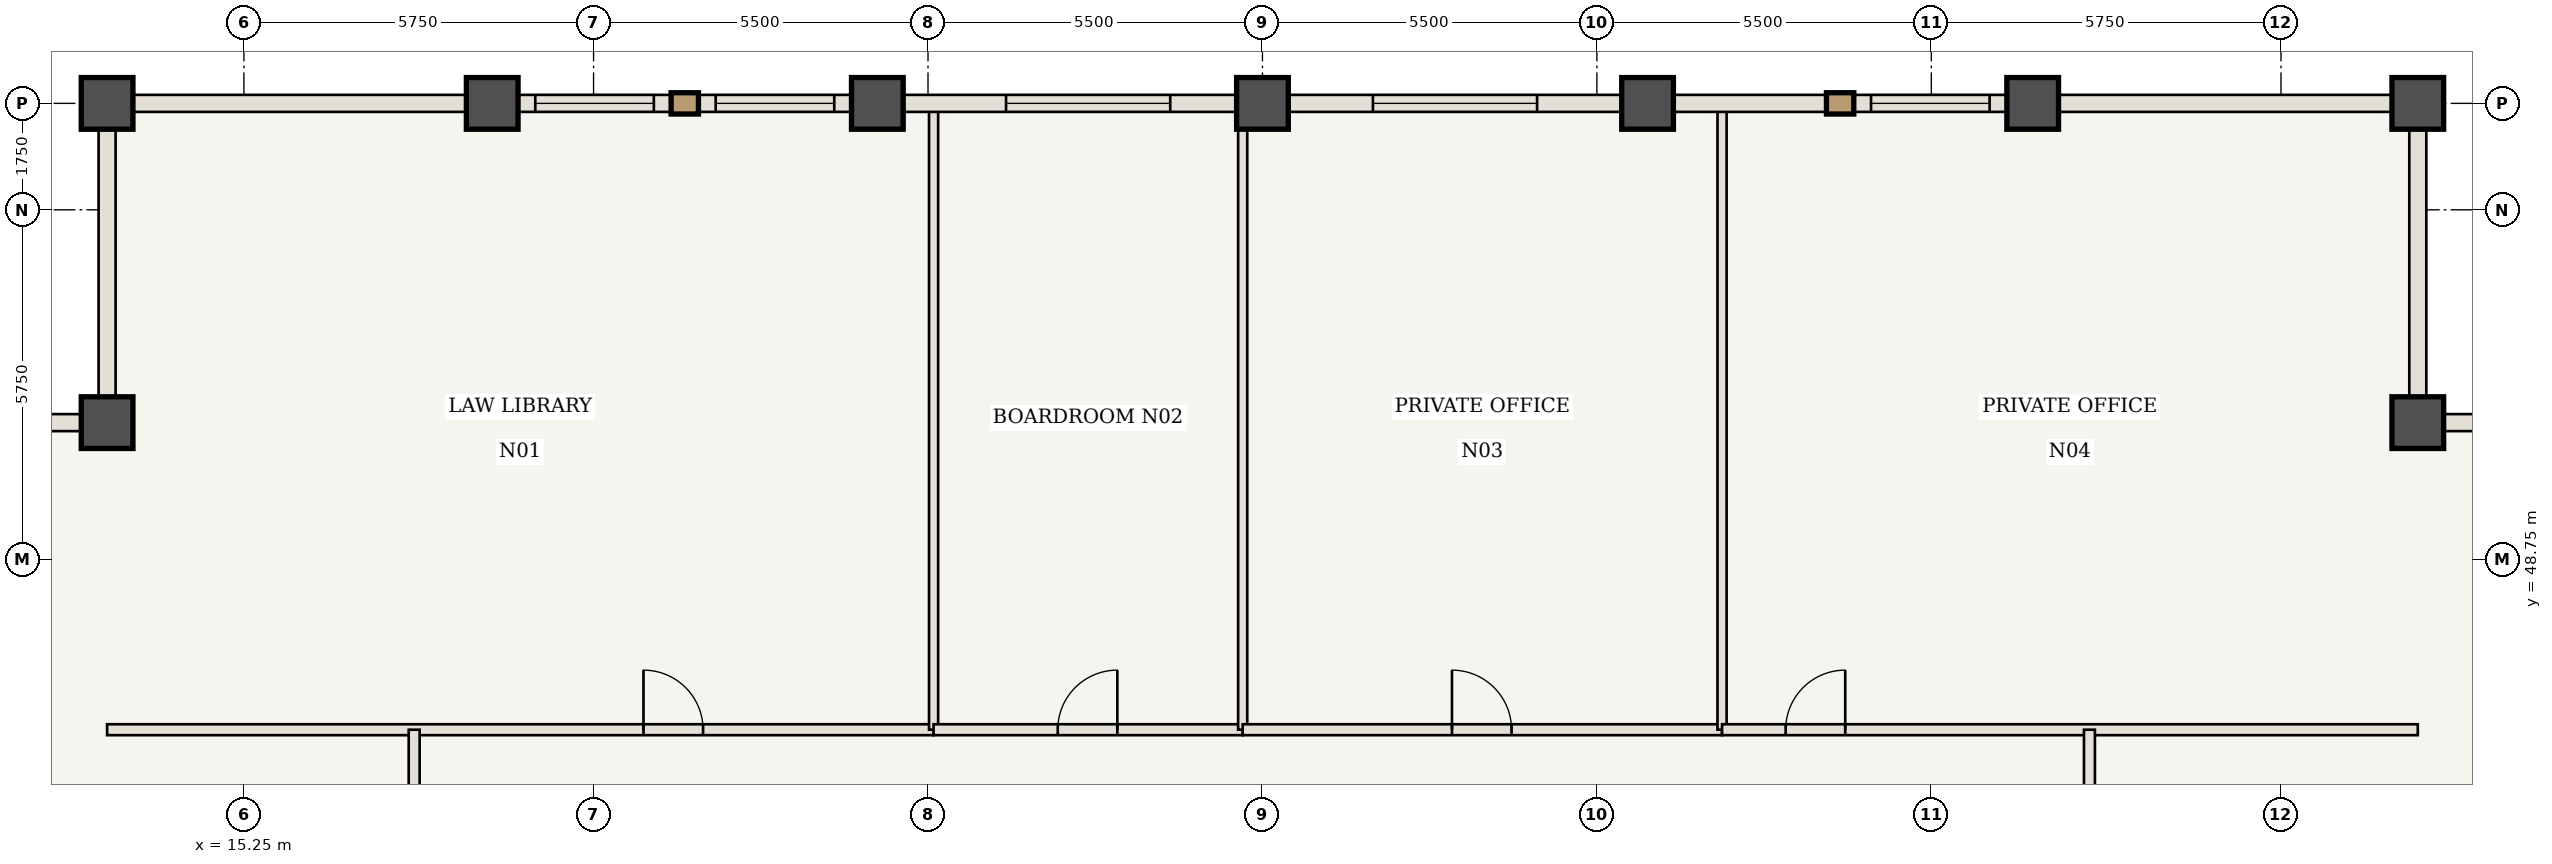
"""IFC4 building model, lengths in metres.
Left out: names, types, materials, properties, quantities, classifications, styles, units other than length and angle.
Written with IfcOpenShell. Run it as: python <this file> out.ifc"""

import sys

from ifc_helpers import new_model, si_unit, direction, frame, frame_2d, origin, origin_2d, place, context, subcontext, project, spatial, rectangle, extrude, element, fill, save


model = new_model("IFC4")
c1 = context("Model", 3, precision=1e-05, world=origin(), true_north=direction((0.0, 1.0)))
c2 = subcontext(c1, "Body", "Model", "MODEL_VIEW")
j1 = project(units=[si_unit("LENGTHUNIT", "METRE"), si_unit("PLANEANGLEUNIT", "RADIAN")], contexts=[c1])
p1 = place(None, origin())
s1 = spatial("IfcSite", under=j1, at=p1, CompositionType="ELEMENT")
p2 = place(p1, origin())
s2 = spatial("IfcBuilding", under=s1, at=p2, CompositionType="ELEMENT")
p3 = place(p2, frame((0.0, 0.0, 202.3)))
s3 = spatial("IfcBuildingStorey", under=s2, at=p3, CompositionType="ELEMENT", Elevation=202.3)
for number, where, z_axis, x_axis in (
    (1, (51.0, 51.0, 0.0), (0.0, 0.0, 1.0), (1.0, 0.0, 0.0)),
    (2, (51.0, 56.25, 0.0), (0.0, 0.0, 1.0), (1.0, 0.0, 0.0)),
    (3, (13.0, 56.25, 0.0), (0.0, 0.0, 1.0), (1.0, 0.0, 0.0)),
    (4, (13.0, 51.0, 0.0), (0.0, 0.0, 1.0), (1.0, 0.0, 0.0)),
    (5, (19.333, 56.25, 0.0), (0.0, 0.0, 1.0), (1.0, 0.0, 0.0)),
    (6, (25.667, 56.25, 0.0), (0.0, 0.0, 1.0), (1.0, 0.0, 0.0)),
    (7, (32.0, 56.25, 0.0), (0.0, 0.0, 1.0), (1.0, 0.0, 0.0)),
    (8, (38.333, 56.25, 0.0), (0.0, 0.0, 1.0), (1.0, 0.0, 0.0)),
    (9, (44.667, 56.25, 0.0), (0.0, 0.0, 1.0), (1.0, 0.0, 0.0)),
):
    element("IfcColumn", number, at=place(p3, frame(where, z_axis=z_axis, x_axis=x_axis)), inside=s3, PredefinedType="COLUMN", context=c2, shape_type="SweptSolid", body=[
        extrude(rectangle(XDim=0.85, YDim=0.85, at=origin_2d()), origin(), (0.0, 0.0, 1.0), 3.85),
    ])
p4 = place(p3, frame((13.0, 45.95, 0.0), z_axis=(0.0, 0.0, 1.0), x_axis=(1.0, 0.0, 0.0)))
e10 = element("IfcWall", 10, at=p4, inside=s3, PredefinedType="STANDARD", context=c2, shape_type="SweptSolid", body=[
    extrude(rectangle(XDim=13.592, YDim=0.18, at=frame_2d((6.796, 0.0))), origin(), (0.0, 0.0, 1.0), 3.685),
])
p5 = place(p4, frame((8.821, 0.0, 0.0)))
e11 = element("IfcOpeningElement", 11, at=p5, cuts=e10, PredefinedType="OPENING", context=c2, shape_type="SweptSolid", body=[
    extrude(rectangle(XDim=0.98, YDim=2.2, at=frame_2d((0.49, 1.1))), frame((0.0, 0.1, 0.0), z_axis=(0.0, -1.0, 0.0), x_axis=(1.0, 0.0, 0.0)), (0.0, 0.0, 1.0), 0.2),
])
p6 = place(p3, frame((26.592, 45.95, 0.0), z_axis=(0.0, 0.0, 1.0), x_axis=(0.0, 1.0, 0.0)))
e12 = element("IfcWall", 12, at=p6, inside=s3, PredefinedType="STANDARD", context=c2, shape_type="SweptSolid", body=[
    extrude(rectangle(XDim=10.24, YDim=0.15, at=frame_2d((5.12, 0.0))), origin(), (0.0, 0.0, 1.0), 3.685),
])
p7 = place(p3, frame((26.592, 45.95, 0.0), z_axis=(0.0, 0.0, 1.0), x_axis=(1.0, 0.0, 0.0)))
e13 = element("IfcWall", 13, at=p7, inside=s3, PredefinedType="STANDARD", context=c2, shape_type="SweptSolid", body=[
    extrude(rectangle(XDim=5.083, YDim=0.18, at=frame_2d((2.542, 0.0))), origin(), (0.0, 0.0, 1.0), 3.685),
])
p8 = place(p7, frame((2.042, 0.0, 0.0)))
e14 = element("IfcOpeningElement", 14, at=p8, cuts=e13, PredefinedType="OPENING", context=c2, shape_type="SweptSolid", body=[
    extrude(rectangle(XDim=0.98, YDim=2.2, at=frame_2d((0.49, 1.1))), frame((0.0, 0.1, 0.0), z_axis=(0.0, -1.0, 0.0), x_axis=(1.0, 0.0, 0.0)), (0.0, 0.0, 1.0), 0.2),
])
p9 = place(p3, frame((31.675, 45.95, 0.0), z_axis=(0.0, 0.0, 1.0), x_axis=(0.0, 1.0, 0.0)))
e15 = element("IfcWall", 15, at=p9, inside=s3, PredefinedType="STANDARD", context=c2, shape_type="SweptSolid", body=[
    extrude(rectangle(XDim=10.24, YDim=0.15, at=frame_2d((5.12, 0.0))), origin(), (0.0, 0.0, 1.0), 3.685),
])
p10 = place(p3, frame((31.675, 45.95, 0.0), z_axis=(0.0, 0.0, 1.0), x_axis=(1.0, 0.0, 0.0)))
e16 = element("IfcWall", 16, at=p10, inside=s3, PredefinedType="STANDARD", context=c2, shape_type="SweptSolid", body=[
    extrude(rectangle(XDim=7.883, YDim=0.18, at=frame_2d((3.942, 0.0))), origin(), (0.0, 0.0, 1.0), 3.685),
])
p11 = place(p10, frame((3.442, 0.0, 0.0)))
e17 = element("IfcOpeningElement", 17, at=p11, cuts=e16, PredefinedType="OPENING", context=c2, shape_type="SweptSolid", body=[
    extrude(rectangle(XDim=0.98, YDim=2.2, at=frame_2d((0.49, 1.1))), frame((0.0, 0.1, 0.0), z_axis=(0.0, -1.0, 0.0), x_axis=(1.0, 0.0, 0.0)), (0.0, 0.0, 1.0), 0.2),
])
p12 = place(p3, frame((39.558, 45.95, 0.0), z_axis=(0.0, 0.0, 1.0), x_axis=(0.0, 1.0, 0.0)))
e18 = element("IfcWall", 18, at=p12, inside=s3, PredefinedType="STANDARD", context=c2, shape_type="SweptSolid", body=[
    extrude(rectangle(XDim=10.24, YDim=0.15, at=frame_2d((5.12, 0.0))), origin(), (0.0, 0.0, 1.0), 3.685),
])
p13 = place(p3, frame((39.558, 45.95, 0.0), z_axis=(0.0, 0.0, 1.0), x_axis=(1.0, 0.0, 0.0)))
e19 = element("IfcWall", 19, at=p13, inside=s3, PredefinedType="STANDARD", context=c2, shape_type="SweptSolid", body=[
    extrude(rectangle(XDim=11.442, YDim=0.18, at=frame_2d((5.721, 0.0))), origin(), (0.0, 0.0, 1.0), 3.685),
])
p14 = place(p13, frame((1.046, 0.0, 0.0)))
e20 = element("IfcOpeningElement", 20, at=p14, cuts=e19, PredefinedType="OPENING", context=c2, shape_type="SweptSolid", body=[
    extrude(rectangle(XDim=0.98, YDim=2.2, at=frame_2d((0.49, 1.1))), frame((0.0, 0.1, 0.0), z_axis=(0.0, -1.0, 0.0), x_axis=(1.0, 0.0, 0.0)), (0.0, 0.0, 1.0), 0.2),
])
p15 = place(p3, frame((18.05, 30.875, 0.0), z_axis=(0.0, 0.0, 1.0), x_axis=(0.0, 1.0, 0.0)))
e21 = element("IfcWall", 21, at=p15, inside=s3, PredefinedType="STANDARD", context=c2, shape_type="SweptSolid", body=[
    extrude(rectangle(XDim=15.075, YDim=0.18, at=frame_2d((7.538, 0.0))), origin(), (0.0, 0.0, 1.0), 3.685),
])
p16 = place(p15, frame((7.038, 0.0, 0.0)))
e22 = element("IfcOpeningElement", 22, at=p16, cuts=e21, PredefinedType="OPENING", context=c2, shape_type="SweptSolid", body=[
    extrude(rectangle(XDim=0.98, YDim=2.2, at=frame_2d((0.49, 1.1))), frame((0.0, 0.1, 0.0), z_axis=(0.0, -1.0, 0.0), x_axis=(1.0, 0.0, 0.0)), (0.0, 0.0, 1.0), 0.2),
])
p17 = place(p3, frame((45.6, 30.75, 0.0), z_axis=(0.0, 0.0, 1.0), x_axis=(0.0, 1.0, 0.0)))
e23 = element("IfcWall", 23, at=p17, inside=s3, PredefinedType="STANDARD", context=c2, shape_type="SweptSolid", body=[
    extrude(rectangle(XDim=15.2, YDim=0.18, at=frame_2d((7.6, 0.0))), origin(), (0.0, 0.0, 1.0), 3.685),
])
p18 = place(p17, frame((7.1, 0.0, 0.0)))
e24 = element("IfcOpeningElement", 24, at=p18, cuts=e23, PredefinedType="OPENING", context=c2, shape_type="SweptSolid", body=[
    extrude(rectangle(XDim=0.98, YDim=2.2, at=frame_2d((0.49, 1.1))), frame((0.0, 0.1, 0.0), z_axis=(0.0, -1.0, 0.0), x_axis=(1.0, 0.0, 0.0)), (0.0, 0.0, 1.0), 0.2),
])
p19 = place(p3, frame((13.0, 56.25, 0.0), z_axis=(0.0, 0.0, 1.0), x_axis=(1.0, 0.0, 0.0)))
e25 = element("IfcWall", 25, at=p19, inside=s3, PredefinedType="USERDEFINED", context=c2, shape_type="SweptSolid", body=[
    extrude(rectangle(XDim=6.333, YDim=0.28, at=frame_2d((3.167, 0.0))), origin(), (0.0, 0.0, 1.0), 2.985),
])
p20 = place(p3, frame((19.333, 56.25, 0.0), z_axis=(0.0, 0.0, 1.0), x_axis=(1.0, 0.0, 0.0)))
e26 = element("IfcWall", 26, at=p20, inside=s3, PredefinedType="USERDEFINED", context=c2, shape_type="SweptSolid", body=[
    extrude(rectangle(XDim=6.333, YDim=0.28, at=frame_2d((3.167, 0.0))), origin(), (0.0, 0.0, 1.0), 2.985),
])
p21 = place(p20, frame((0.708, 0.0, 0.85)))
e27 = element("IfcOpeningElement", 27, at=p21, cuts=e26, PredefinedType="OPENING", context=c2, shape_type="SweptSolid", body=[
    extrude(rectangle(XDim=1.95, YDim=1.935, at=frame_2d((0.975, 0.968))), frame((0.0, 0.15, 0.0), z_axis=(0.0, -1.0, 0.0), x_axis=(1.0, 0.0, 0.0)), (0.0, 0.0, 1.0), 0.3),
])
p22 = place(p20, frame((3.675, 0.0, 0.85)))
e28 = element("IfcOpeningElement", 28, at=p22, cuts=e26, PredefinedType="OPENING", context=c2, shape_type="SweptSolid", body=[
    extrude(rectangle(XDim=1.95, YDim=1.935, at=frame_2d((0.975, 0.968))), frame((0.0, 0.15, 0.0), z_axis=(0.0, -1.0, 0.0), x_axis=(1.0, 0.0, 0.0)), (0.0, 0.0, 1.0), 0.3),
])
p23 = place(p3, frame((25.667, 56.25, 0.0), z_axis=(0.0, 0.0, 1.0), x_axis=(1.0, 0.0, 0.0)))
e29 = element("IfcWall", 29, at=p23, inside=s3, PredefinedType="USERDEFINED", context=c2, shape_type="SweptSolid", body=[
    extrude(rectangle(XDim=6.333, YDim=0.28, at=frame_2d((3.167, 0.0))), origin(), (0.0, 0.0, 1.0), 2.985),
])
p24 = place(p23, frame((2.117, 0.0, 0.85)))
e30 = element("IfcOpeningElement", 30, at=p24, cuts=e29, PredefinedType="OPENING", context=c2, shape_type="SweptSolid", body=[
    extrude(rectangle(XDim=2.7, YDim=1.935, at=frame_2d((1.35, 0.968))), frame((0.0, 0.15, 0.0), z_axis=(0.0, -1.0, 0.0), x_axis=(1.0, 0.0, 0.0)), (0.0, 0.0, 1.0), 0.3),
])
p25 = place(p3, frame((32.0, 56.25, 0.0), z_axis=(0.0, 0.0, 1.0), x_axis=(1.0, 0.0, 0.0)))
e31 = element("IfcWall", 31, at=p25, inside=s3, PredefinedType="USERDEFINED", context=c2, shape_type="SweptSolid", body=[
    extrude(rectangle(XDim=6.333, YDim=0.28, at=frame_2d((3.167, 0.0))), origin(), (0.0, 0.0, 1.0), 2.985),
])
p26 = place(p25, frame((1.817, 0.0, 0.85)))
e32 = element("IfcOpeningElement", 32, at=p26, cuts=e31, PredefinedType="OPENING", context=c2, shape_type="SweptSolid", body=[
    extrude(rectangle(XDim=2.7, YDim=1.935, at=frame_2d((1.35, 0.968))), frame((0.0, 0.15, 0.0), z_axis=(0.0, -1.0, 0.0), x_axis=(1.0, 0.0, 0.0)), (0.0, 0.0, 1.0), 0.3),
])
p27 = place(p3, frame((38.333, 56.25, 0.0), z_axis=(0.0, 0.0, 1.0), x_axis=(1.0, 0.0, 0.0)))
e33 = element("IfcWall", 33, at=p27, inside=s3, PredefinedType="USERDEFINED", context=c2, shape_type="SweptSolid", body=[
    extrude(rectangle(XDim=6.333, YDim=0.28, at=frame_2d((3.167, 0.0))), origin(), (0.0, 0.0, 1.0), 2.985),
])
p28 = place(p27, frame((3.675, 0.0, 0.85)))
e34 = element("IfcOpeningElement", 34, at=p28, cuts=e33, PredefinedType="OPENING", context=c2, shape_type="SweptSolid", body=[
    extrude(rectangle(XDim=1.95, YDim=1.935, at=frame_2d((0.975, 0.968))), frame((0.0, 0.15, 0.0), z_axis=(0.0, -1.0, 0.0), x_axis=(1.0, 0.0, 0.0)), (0.0, 0.0, 1.0), 0.3),
])
p29 = place(p3, frame((44.667, 56.25, 0.0), z_axis=(0.0, 0.0, 1.0), x_axis=(1.0, 0.0, 0.0)))
e35 = element("IfcWall", 35, at=p29, inside=s3, PredefinedType="USERDEFINED", context=c2, shape_type="SweptSolid", body=[
    extrude(rectangle(XDim=6.333, YDim=0.28, at=frame_2d((3.167, 0.0))), origin(), (0.0, 0.0, 1.0), 2.985),
])
for number, where, z_axis, x_axis in (
    (36, (51.0, 51.0, 0.0), (0.0, 0.0, 1.0), (1.0, 0.0, 0.0)),
    (37, (51.0, 56.25, 0.0), (0.0, 0.0, 1.0), (0.0, -1.0, 0.0)),
    (38, (13.0, 51.0, 0.0), (0.0, 0.0, 1.0), (0.0, 1.0, 0.0)),
    (39, (7.75, 51.0, 0.0), (0.0, 0.0, 1.0), (1.0, 0.0, 0.0)),
):
    element("IfcWall", number, at=place(p3, frame(where, z_axis=z_axis, x_axis=x_axis)), inside=s3, PredefinedType="USERDEFINED", context=c2, shape_type="SweptSolid", body=[
        extrude(rectangle(XDim=5.25, YDim=0.28, at=frame_2d((2.625, 0.0))), origin(), (0.0, 0.0, 1.0), 2.985),
    ])
p30 = place(p5, origin())
e40 = element("IfcDoor", 40, at=p30, inside=s3, OperationType="SINGLE_SWING_LEFT", PredefinedType="DOOR", context=c2, shape_type="SweptSolid", body=[
    extrude(rectangle(XDim=0.98, YDim=2.2, at=frame_2d((0.49, 1.1))), frame((0.0, 0.025, 0.0), z_axis=(0.0, -1.0, 0.0), x_axis=(1.0, 0.0, 0.0)), (0.0, 0.0, 1.0), 0.05),
])
fill(e11, e40)
p31 = place(p8, origin())
e41 = element("IfcDoor", 41, at=p31, inside=s3, OperationType="SINGLE_SWING_RIGHT", PredefinedType="DOOR", context=c2, shape_type="SweptSolid", body=[
    extrude(rectangle(XDim=0.98, YDim=2.2, at=frame_2d((0.49, 1.1))), frame((0.0, 0.025, 0.0), z_axis=(0.0, -1.0, 0.0), x_axis=(1.0, 0.0, 0.0)), (0.0, 0.0, 1.0), 0.05),
])
fill(e14, e41)
p32 = place(p11, origin())
e42 = element("IfcDoor", 42, at=p32, inside=s3, OperationType="SINGLE_SWING_LEFT", PredefinedType="DOOR", context=c2, shape_type="SweptSolid", body=[
    extrude(rectangle(XDim=0.98, YDim=2.2, at=frame_2d((0.49, 1.1))), frame((0.0, 0.025, 0.0), z_axis=(0.0, -1.0, 0.0), x_axis=(1.0, 0.0, 0.0)), (0.0, 0.0, 1.0), 0.05),
])
fill(e17, e42)
p33 = place(p14, origin())
e43 = element("IfcDoor", 43, at=p33, inside=s3, OperationType="SINGLE_SWING_RIGHT", PredefinedType="DOOR", context=c2, shape_type="SweptSolid", body=[
    extrude(rectangle(XDim=0.98, YDim=2.2, at=frame_2d((0.49, 1.1))), frame((0.0, 0.025, 0.0), z_axis=(0.0, -1.0, 0.0), x_axis=(1.0, 0.0, 0.0)), (0.0, 0.0, 1.0), 0.05),
])
fill(e20, e43)
p34 = place(p21, origin())
e44 = element("IfcWindow", 44, at=p34, inside=s3, PartitioningType="SINGLE_PANEL", PredefinedType="WINDOW", context=c2, shape_type="SweptSolid", body=[
    extrude(rectangle(XDim=1.95, YDim=1.935, at=frame_2d((0.975, 0.968))), frame((0.0, 0.03, 0.0), z_axis=(0.0, -1.0, 0.0), x_axis=(1.0, 0.0, 0.0)), (0.0, 0.0, 1.0), 0.06),
])
fill(e27, e44)
p35 = place(p22, origin())
e45 = element("IfcWindow", 45, at=p35, inside=s3, PartitioningType="SINGLE_PANEL", PredefinedType="WINDOW", context=c2, shape_type="SweptSolid", body=[
    extrude(rectangle(XDim=1.95, YDim=1.935, at=frame_2d((0.975, 0.968))), frame((0.0, 0.03, 0.0), z_axis=(0.0, -1.0, 0.0), x_axis=(1.0, 0.0, 0.0)), (0.0, 0.0, 1.0), 0.06),
])
fill(e28, e45)
p36 = place(p24, origin())
e46 = element("IfcWindow", 46, at=p36, inside=s3, PartitioningType="SINGLE_PANEL", PredefinedType="WINDOW", context=c2, shape_type="SweptSolid", body=[
    extrude(rectangle(XDim=2.7, YDim=1.935, at=frame_2d((1.35, 0.968))), frame((0.0, 0.03, 0.0), z_axis=(0.0, -1.0, 0.0), x_axis=(1.0, 0.0, 0.0)), (0.0, 0.0, 1.0), 0.06),
])
fill(e30, e46)
p37 = place(p26, origin())
e47 = element("IfcWindow", 47, at=p37, inside=s3, PartitioningType="SINGLE_PANEL", PredefinedType="WINDOW", context=c2, shape_type="SweptSolid", body=[
    extrude(rectangle(XDim=2.7, YDim=1.935, at=frame_2d((1.35, 0.968))), frame((0.0, 0.03, 0.0), z_axis=(0.0, -1.0, 0.0), x_axis=(1.0, 0.0, 0.0)), (0.0, 0.0, 1.0), 0.06),
])
fill(e32, e47)
p38 = place(p28, origin())
e48 = element("IfcWindow", 48, at=p38, inside=s3, PartitioningType="SINGLE_PANEL", PredefinedType="WINDOW", context=c2, shape_type="SweptSolid", body=[
    extrude(rectangle(XDim=1.95, YDim=1.935, at=frame_2d((0.975, 0.968))), frame((0.0, 0.03, 0.0), z_axis=(0.0, -1.0, 0.0), x_axis=(1.0, 0.0, 0.0)), (0.0, 0.0, 1.0), 0.06),
])
fill(e34, e48)
save(model, sys.argv[1])
